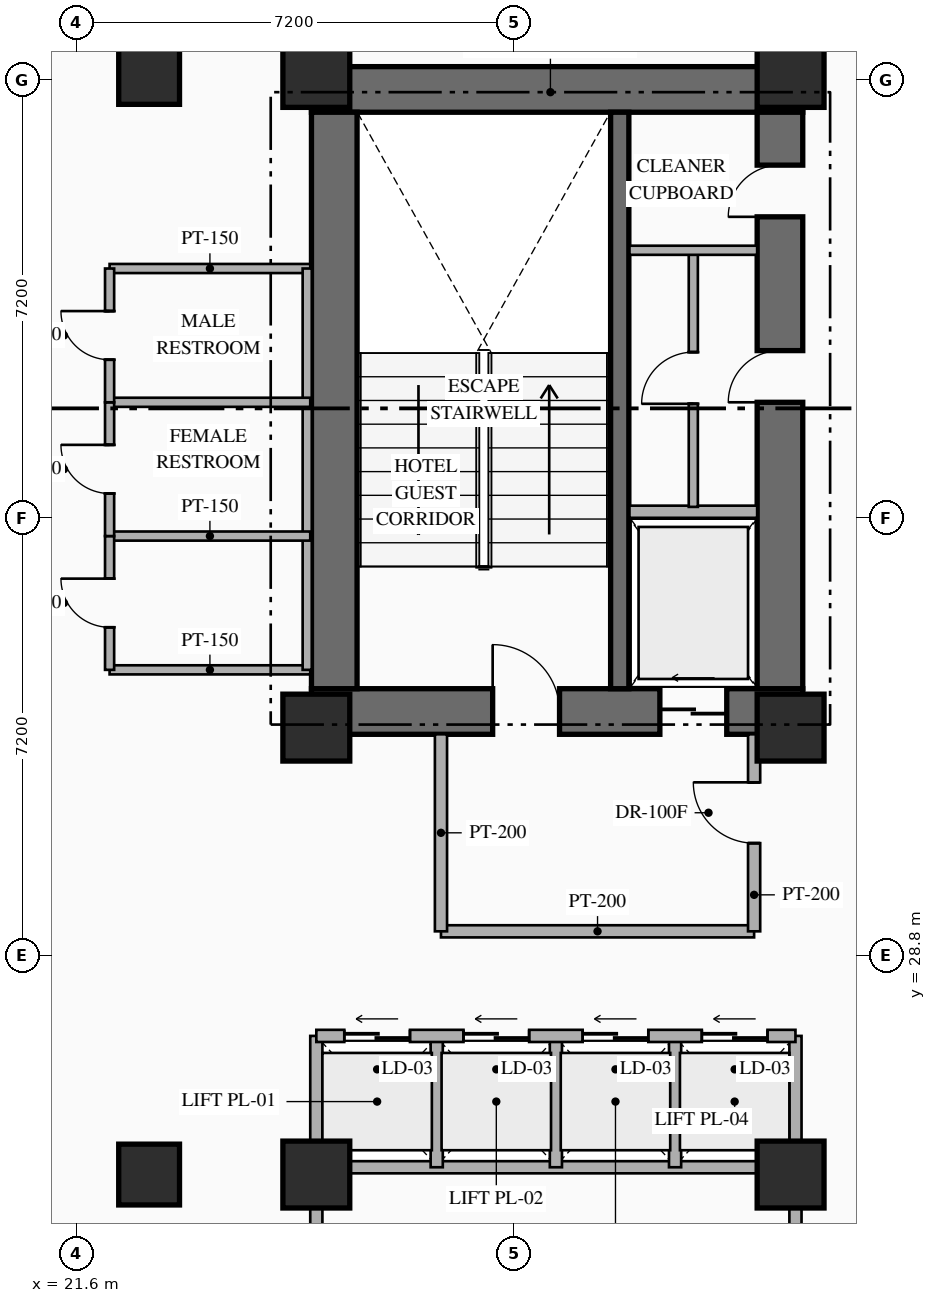
"""IFC4 building model, lengths in metres.
Left out: names, types, materials, properties, quantities, classifications, styles, units other than length and angle.
Written with IfcOpenShell. Run it as: python <this file> out.ifc"""

import sys

from ifc_helpers import new_model, si_unit, direction, frame, frame_2d, origin, origin_2d, place, context, subcontext, project, spatial, rectangle, hollow_rectangle, extrude, element, fill, save


model = new_model("IFC4")
c1 = context("Model", 3, precision=1e-05, world=origin(), true_north=direction((0.0, 1.0)))
c2 = subcontext(c1, "Body", "Model", "MODEL_VIEW")
j1 = project(units=[si_unit("LENGTHUNIT", "METRE"), si_unit("PLANEANGLEUNIT", "RADIAN")], contexts=[c1])
p1 = place(None, origin())
s1 = spatial("IfcSite", under=j1, at=p1, CompositionType="ELEMENT")
p2 = place(p1, origin())
s2 = spatial("IfcBuilding", under=s1, at=p2, CompositionType="ELEMENT")
p3 = place(p2, frame((0.0, 0.0, 53.35)))
s3 = spatial("IfcBuildingStorey", under=s2, at=p3, CompositionType="ELEMENT", Elevation=53.35)
p4 = place(p3, frame((25.47, 32.815, 0.0), z_axis=(0.0, 0.0, 1.0), x_axis=(1.0, 0.0, 0.0)))
e1 = element("IfcWall", 1, at=p4, inside=s3, PredefinedType="SHEAR", context=c2, shape_type="SweptSolid", body=[
    extrude(rectangle(XDim=8.08, YDim=0.75, at=frame_2d((4.04, 0.0))), origin(), (0.0, 0.0, 1.0), 3.35),
])
p5 = place(p4, frame((2.98, 0.0, 0.0)))
e2 = element("IfcOpeningElement", 2, at=p5, cuts=e1, PredefinedType="OPENING", context=c2, shape_type="SweptSolid", body=[
    extrude(rectangle(XDim=1.1, YDim=2.2, at=frame_2d((0.55, 1.1))), frame((0.0, 0.385, 0.0), z_axis=(0.0, -1.0, 0.0), x_axis=(1.0, 0.0, 0.0)), (0.0, 0.0, 1.0), 0.77),
])
p6 = place(p4, frame((5.73, 0.0, 0.0)))
e3 = element("IfcOpeningElement", 3, at=p6, cuts=e1, PredefinedType="OPENING", context=c2, shape_type="SweptSolid", body=[
    extrude(rectangle(XDim=1.1, YDim=2.15, at=frame_2d((0.55, 1.075))), frame((0.0, 0.385, 0.0), z_axis=(0.0, -1.0, 0.0), x_axis=(1.0, 0.0, 0.0)), (0.0, 0.0, 1.0), 0.77),
])
p7 = place(p3, frame((25.47, 43.045, 0.0), z_axis=(0.0, 0.0, 1.0), x_axis=(1.0, 0.0, 0.0)))
e4 = element("IfcWall", 4, at=p7, inside=s3, PredefinedType="SHEAR", context=c2, shape_type="SweptSolid", body=[
    extrude(rectangle(XDim=8.08, YDim=0.75, at=frame_2d((4.04, 0.0))), origin(), (0.0, 0.0, 1.0), 3.35),
])
p8 = place(p3, frame((25.845, 33.19, 0.0), z_axis=(0.0, 0.0, 1.0), x_axis=(0.0, 1.0, 0.0)))
e5 = element("IfcWall", 5, at=p8, inside=s3, PredefinedType="SHEAR", context=c2, shape_type="SweptSolid", body=[
    extrude(rectangle(XDim=9.48, YDim=0.75, at=frame_2d((4.74, 0.0))), origin(), (0.0, 0.0, 1.0), 3.35),
])
p9 = place(p3, frame((33.175, 33.19, 0.0), z_axis=(0.0, 0.0, 1.0), x_axis=(0.0, 1.0, 0.0)))
e6 = element("IfcWall", 6, at=p9, inside=s3, PredefinedType="SHEAR", context=c2, shape_type="SweptSolid", body=[
    extrude(rectangle(XDim=9.48, YDim=0.75, at=frame_2d((4.74, 0.0))), origin(), (0.0, 0.0, 1.0), 3.35),
])
p10 = place(p9, frame((4.71, 0.0, 0.0)))
e7 = element("IfcOpeningElement", 7, at=p10, cuts=e6, PredefinedType="OPENING", context=c2, shape_type="SweptSolid", body=[
    extrude(rectangle(XDim=0.85, YDim=2.08, at=frame_2d((0.425, 1.04))), frame((0.0, 0.385, 0.0), z_axis=(0.0, -1.0, 0.0), x_axis=(1.0, 0.0, 0.0)), (0.0, 0.0, 1.0), 0.77),
])
p11 = place(p9, frame((7.76, 0.0, 0.0)))
e8 = element("IfcOpeningElement", 8, at=p11, cuts=e6, PredefinedType="OPENING", context=c2, shape_type="SweptSolid", body=[
    extrude(rectangle(XDim=0.85, YDim=2.08, at=frame_2d((0.425, 1.04))), frame((0.0, 0.385, 0.0), z_axis=(0.0, -1.0, 0.0), x_axis=(1.0, 0.0, 0.0)), (0.0, 0.0, 1.0), 0.77),
])
p12 = place(p3, frame((30.54, 33.19, 0.0), z_axis=(0.0, 0.0, 1.0), x_axis=(0.0, 1.0, 0.0)))
e9 = element("IfcWall", 9, at=p12, inside=s3, PredefinedType="SHEAR", context=c2, shape_type="SweptSolid", body=[
    extrude(rectangle(XDim=9.48, YDim=0.3, at=frame_2d((4.74, 0.0))), origin(), (0.0, 0.0, 1.0), 3.35),
])
for number, where, z_axis, x_axis in (
    (10, (25.55, 32.55, 0.0), (0.0, 0.0, 1.0), (1.0, 0.0, 0.0)),
    (11, (33.35, 32.55, 0.0), (0.0, 0.0, 1.0), (1.0, 0.0, 0.0)),
    (12, (25.55, 43.3, 0.0), (0.0, 0.0, 1.0), (1.0, 0.0, 0.0)),
    (13, (33.35, 43.3, 0.0), (0.0, 0.0, 1.0), (1.0, 0.0, 0.0)),
):
    element("IfcColumn", number, at=place(p3, frame(where, z_axis=z_axis, x_axis=x_axis)), inside=s3, PredefinedType="COLUMN", context=c2, shape_type="SweptSolid", body=[
        extrude(rectangle(XDim=1.1, YDim=1.1, at=origin_2d()), origin(), (0.0, 0.0, 1.0), 3.35),
    ])
for number, where, z_axis, x_axis in (
    (14, (25.55, 25.2, 0.0), (0.0, 0.0, 1.0), (1.0, 0.0, 0.0)),
    (15, (33.35, 25.2, 0.0), (0.0, 0.0, 1.0), (1.0, 0.0, 0.0)),
):
    element("IfcColumn", number, at=place(p3, frame(where, z_axis=z_axis, x_axis=x_axis)), inside=s3, PredefinedType="COLUMN", context=c2, shape_type="SweptSolid", body=[
        extrude(hollow_rectangle(XDim=1.1, YDim=1.1, WallThickness=0.04, at=origin_2d()), origin(), (0.0, 0.0, 1.0), 3.35),
    ])
for number, where, z_axis, x_axis in (
    (16, (22.8, 25.2, 0.0), (0.0, 0.0, 1.0), (1.0, 0.0, 0.0)),
    (17, (22.8, 43.3, 0.0), (0.0, 0.0, 1.0), (1.0, 0.0, 0.0)),
):
    element("IfcColumn", number, at=place(p3, frame(where, z_axis=z_axis, x_axis=x_axis)), inside=s3, PredefinedType="COLUMN", context=c2, shape_type="SweptSolid", body=[
        extrude(hollow_rectangle(XDim=1.0, YDim=1.0, WallThickness=0.038, at=origin_2d()), origin(), (0.0, 0.0, 1.0), 3.35),
    ])
p13 = place(p3, frame((30.7, 36.1, 0.0), z_axis=(0.0, 0.0, 1.0), x_axis=(1.0, 0.0, 0.0)))
e18 = element("IfcWall", 18, at=p13, inside=s3, PredefinedType="STANDARD", context=c2, shape_type="SweptSolid", body=[
    extrude(rectangle(XDim=2.1, YDim=0.2, at=frame_2d((1.05, 0.0))), origin(), (0.0, 0.0, 1.0), 3.13),
])
p14 = place(p3, frame((31.75, 36.18, 0.0), z_axis=(0.0, 0.0, 1.0), x_axis=(0.0, 1.0, 0.0)))
e19 = element("IfcWall", 19, at=p14, inside=s3, PredefinedType="PARTITIONING", context=c2, shape_type="SweptSolid", body=[
    extrude(rectangle(XDim=4.24, YDim=0.15, at=frame_2d((2.12, 0.0))), origin(), (0.0, 0.0, 1.0), 3.13),
])
p15 = place(p14, frame((1.695, 0.0, 0.0)))
e20 = element("IfcOpeningElement", 20, at=p15, cuts=e19, PredefinedType="OPENING", context=c2, shape_type="SweptSolid", body=[
    extrude(rectangle(XDim=0.85, YDim=2.08, at=frame_2d((0.425, 1.04))), frame((0.0, 0.085, 0.0), z_axis=(0.0, -1.0, 0.0), x_axis=(1.0, 0.0, 0.0)), (0.0, 0.0, 1.0), 0.17),
])
p16 = place(p3, frame((30.7, 40.4, 0.0), z_axis=(0.0, 0.0, 1.0), x_axis=(1.0, 0.0, 0.0)))
e21 = element("IfcWall", 21, at=p16, inside=s3, PredefinedType="PARTITIONING", context=c2, shape_type="SweptSolid", body=[
    extrude(rectangle(XDim=2.1, YDim=0.15, at=frame_2d((1.05, 0.0))), origin(), (0.0, 0.0, 1.0), 3.13),
])
p17 = place(p3, frame((27.6, 29.2, 0.0), z_axis=(0.0, 0.0, 1.0), x_axis=(1.0, 0.0, 0.0)))
e22 = element("IfcWall", 22, at=p17, inside=s3, PredefinedType="STANDARD", context=c2, shape_type="SweptSolid", body=[
    extrude(rectangle(XDim=5.15, YDim=0.2, at=frame_2d((2.575, 0.0))), origin(), (0.0, 0.0, 1.0), 3.13),
])
p18 = place(p3, frame((27.6, 29.2, 0.0), z_axis=(0.0, 0.0, 1.0), x_axis=(0.0, 1.0, 0.0)))
e23 = element("IfcWall", 23, at=p18, inside=s3, PredefinedType="STANDARD", context=c2, shape_type="SweptSolid", body=[
    extrude(rectangle(XDim=3.24, YDim=0.2, at=frame_2d((1.62, 0.0))), origin(), (0.0, 0.0, 1.0), 3.13),
])
p19 = place(p3, frame((32.75, 29.2, 0.0), z_axis=(0.0, 0.0, 1.0), x_axis=(0.0, 1.0, 0.0)))
e24 = element("IfcWall", 24, at=p19, inside=s3, PredefinedType="STANDARD", context=c2, shape_type="SweptSolid", body=[
    extrude(rectangle(XDim=3.24, YDim=0.2, at=frame_2d((1.62, 0.0))), origin(), (0.0, 0.0, 1.0), 3.13),
])
p20 = place(p19, frame((1.45, 0.0, 0.0)))
e25 = element("IfcOpeningElement", 25, at=p20, cuts=e24, PredefinedType="OPENING", context=c2, shape_type="SweptSolid", body=[
    extrude(rectangle(XDim=1.0, YDim=2.2, at=frame_2d((0.5, 1.1))), frame((0.0, 0.11, 0.0), z_axis=(0.0, -1.0, 0.0), x_axis=(1.0, 0.0, 0.0)), (0.0, 0.0, 1.0), 0.22),
])
for number, where, z_axis, x_axis in (
    (26, (25.55, 23.4, 0.0), (0.0, 0.0, 1.0), (0.0, 1.0, 0.0)),
    (27, (33.43, 23.4, 0.0), (0.0, 0.0, 1.0), (0.0, 1.0, 0.0)),
):
    element("IfcWall", number, at=place(p3, frame(where, z_axis=z_axis, x_axis=x_axis)), inside=s3, PredefinedType="STANDARD", context=c2, shape_type="SweptSolid", body=[
        extrude(rectangle(XDim=4.08, YDim=0.2, at=frame_2d((2.04, 0.0))), origin(), (0.0, 0.0, 1.0), 2.425),
    ])
p21 = place(p3, frame((25.55, 25.32, 0.0), z_axis=(0.0, 0.0, 1.0), x_axis=(1.0, 0.0, 0.0)))
e28 = element("IfcWall", 28, at=p21, inside=s3, PredefinedType="STANDARD", context=c2, shape_type="SweptSolid", body=[
    extrude(rectangle(XDim=7.88, YDim=0.2, at=frame_2d((3.94, 0.0))), origin(), (0.0, 0.0, 1.0), 2.525),
])
for number, where, z_axis, x_axis in (
    (29, (27.53, 25.32, 0.0), (0.0, 0.0, 1.0), (0.0, 1.0, 0.0)),
    (30, (29.49, 25.32, 0.0), (0.0, 0.0, 1.0), (0.0, 1.0, 0.0)),
    (31, (31.45, 25.32, 0.0), (0.0, 0.0, 1.0), (0.0, 1.0, 0.0)),
):
    element("IfcWall", number, at=place(p3, frame(where, z_axis=z_axis, x_axis=x_axis)), inside=s3, PredefinedType="STANDARD", context=c2, shape_type="SweptSolid", body=[
        extrude(rectangle(XDim=2.16, YDim=0.2, at=frame_2d((1.08, 0.0))), origin(), (0.0, 0.0, 1.0), 3.13),
    ])
p22 = place(p3, frame((25.55, 27.48, 0.0), z_axis=(0.0, 0.0, 1.0), x_axis=(1.0, 0.0, 0.0)))
e32 = element("IfcWall", 32, at=p22, inside=s3, PredefinedType="STANDARD", context=c2, shape_type="SweptSolid", body=[
    extrude(rectangle(XDim=7.88, YDim=0.2, at=frame_2d((3.94, 0.0))), origin(), (0.0, 0.0, 1.0), 3.13),
])
p23 = place(p22, frame((0.46, 0.0, 0.0)))
e33 = element("IfcOpeningElement", 33, at=p23, cuts=e32, PredefinedType="OPENING", context=c2, shape_type="SweptSolid", body=[
    extrude(rectangle(XDim=1.08, YDim=2.15, at=frame_2d((0.54, 1.075))), frame((0.0, 0.11, 0.0), z_axis=(0.0, -1.0, 0.0), x_axis=(1.0, 0.0, 0.0)), (0.0, 0.0, 1.0), 0.22),
])
p24 = place(p22, frame((2.42, 0.0, 0.0)))
e34 = element("IfcOpeningElement", 34, at=p24, cuts=e32, PredefinedType="OPENING", context=c2, shape_type="SweptSolid", body=[
    extrude(rectangle(XDim=1.08, YDim=2.15, at=frame_2d((0.54, 1.075))), frame((0.0, 0.11, 0.0), z_axis=(0.0, -1.0, 0.0), x_axis=(1.0, 0.0, 0.0)), (0.0, 0.0, 1.0), 0.22),
])
p25 = place(p22, frame((4.38, 0.0, 0.0)))
e35 = element("IfcOpeningElement", 35, at=p25, cuts=e32, PredefinedType="OPENING", context=c2, shape_type="SweptSolid", body=[
    extrude(rectangle(XDim=1.08, YDim=2.15, at=frame_2d((0.54, 1.075))), frame((0.0, 0.11, 0.0), z_axis=(0.0, -1.0, 0.0), x_axis=(1.0, 0.0, 0.0)), (0.0, 0.0, 1.0), 0.22),
])
p26 = place(p22, frame((6.34, 0.0, 0.0)))
e36 = element("IfcOpeningElement", 36, at=p26, cuts=e32, PredefinedType="OPENING", context=c2, shape_type="SweptSolid", body=[
    extrude(rectangle(XDim=1.08, YDim=2.15, at=frame_2d((0.54, 1.075))), frame((0.0, 0.11, 0.0), z_axis=(0.0, -1.0, 0.0), x_axis=(1.0, 0.0, 0.0)), (0.0, 0.0, 1.0), 0.22),
])
for number, where, z_axis, x_axis in (
    (37, (22.15, 33.5, 0.0), (0.0, 0.0, 1.0), (1.0, 0.0, 0.0)),
    (38, (22.15, 40.1, 0.0), (0.0, 0.0, 1.0), (1.0, 0.0, 0.0)),
):
    element("IfcWall", number, at=place(p3, frame(where, z_axis=z_axis, x_axis=x_axis)), inside=s3, PredefinedType="PARTITIONING", context=c2, shape_type="SweptSolid", body=[
        extrude(rectangle(XDim=3.3, YDim=0.15, at=frame_2d((1.65, 0.0))), origin(), (0.0, 0.0, 1.0), 3.13),
    ])
p27 = place(p3, frame((25.4, 33.5, 0.0), z_axis=(0.0, 0.0, 1.0), x_axis=(0.0, 1.0, 0.0)))
e39 = element("IfcWall", 39, at=p27, inside=s3, PredefinedType="PARTITIONING", context=c2, shape_type="SweptSolid", body=[
    extrude(rectangle(XDim=6.6, YDim=0.15, at=frame_2d((3.3, 0.0))), origin(), (0.0, 0.0, 1.0), 3.13),
])
for number, where, z_axis, x_axis in (
    (40, (22.15, 35.7, 0.0), (0.0, 0.0, 1.0), (1.0, 0.0, 0.0)),
    (41, (22.15, 37.9, 0.0), (0.0, 0.0, 1.0), (1.0, 0.0, 0.0)),
):
    element("IfcWall", number, at=place(p3, frame(where, z_axis=z_axis, x_axis=x_axis)), inside=s3, PredefinedType="PARTITIONING", context=c2, shape_type="SweptSolid", body=[
        extrude(rectangle(XDim=3.3, YDim=0.15, at=frame_2d((1.65, 0.0))), origin(), (0.0, 0.0, 1.0), 3.13),
    ])
p28 = place(p3, frame((22.15, 33.5, 0.0), z_axis=(0.0, 0.0, 1.0), x_axis=(0.0, 1.0, 0.0)))
e42 = element("IfcWall", 42, at=p28, inside=s3, PredefinedType="PARTITIONING", context=c2, shape_type="SweptSolid", body=[
    extrude(rectangle(XDim=2.2, YDim=0.15, at=frame_2d((1.1, 0.0))), origin(), (0.0, 0.0, 1.0), 3.13),
])
p29 = place(p28, frame((0.7, 0.0, 0.0)))
e43 = element("IfcOpeningElement", 43, at=p29, cuts=e42, PredefinedType="OPENING", context=c2, shape_type="SweptSolid", body=[
    extrude(rectangle(XDim=0.8, YDim=2.06, at=frame_2d((0.4, 1.03))), frame((0.0, 0.085, 0.0), z_axis=(0.0, -1.0, 0.0), x_axis=(1.0, 0.0, 0.0)), (0.0, 0.0, 1.0), 0.17),
])
p30 = place(p3, frame((22.15, 35.7, 0.0), z_axis=(0.0, 0.0, 1.0), x_axis=(0.0, 1.0, 0.0)))
e44 = element("IfcWall", 44, at=p30, inside=s3, PredefinedType="PARTITIONING", context=c2, shape_type="SweptSolid", body=[
    extrude(rectangle(XDim=2.2, YDim=0.15, at=frame_2d((1.1, 0.0))), origin(), (0.0, 0.0, 1.0), 3.13),
])
p31 = place(p30, frame((0.7, 0.0, 0.0)))
e45 = element("IfcOpeningElement", 45, at=p31, cuts=e44, PredefinedType="OPENING", context=c2, shape_type="SweptSolid", body=[
    extrude(rectangle(XDim=0.8, YDim=2.06, at=frame_2d((0.4, 1.03))), frame((0.0, 0.085, 0.0), z_axis=(0.0, -1.0, 0.0), x_axis=(1.0, 0.0, 0.0)), (0.0, 0.0, 1.0), 0.17),
])
p32 = place(p3, frame((22.15, 37.9, 0.0), z_axis=(0.0, 0.0, 1.0), x_axis=(0.0, 1.0, 0.0)))
e46 = element("IfcWall", 46, at=p32, inside=s3, PredefinedType="PARTITIONING", context=c2, shape_type="SweptSolid", body=[
    extrude(rectangle(XDim=2.2, YDim=0.15, at=frame_2d((1.1, 0.0))), origin(), (0.0, 0.0, 1.0), 3.13),
])
p33 = place(p32, frame((0.7, 0.0, 0.0)))
e47 = element("IfcOpeningElement", 47, at=p33, cuts=e46, PredefinedType="OPENING", context=c2, shape_type="SweptSolid", body=[
    extrude(rectangle(XDim=0.8, YDim=2.06, at=frame_2d((0.4, 1.03))), frame((0.0, 0.085, 0.0), z_axis=(0.0, -1.0, 0.0), x_axis=(1.0, 0.0, 0.0)), (0.0, 0.0, 1.0), 0.17),
])
p34 = place(p3, frame((33.384, 17.312, 0.0), z_axis=(0.0, 0.0, 1.0), x_axis=(0.600008743659, 0.799993442181, 0.0)))
e48 = element("IfcWall", 48, at=p34, inside=s3, PredefinedType="PARTITIONING", context=c2, shape_type="SweptSolid", body=[
    extrude(rectangle(XDim=8.935, YDim=0.15, at=frame_2d((4.468, 0.0))), origin(), (0.0, 0.0, 1.0), 3.13),
])
p35 = place(p5, origin())
e49 = element("IfcDoor", 49, at=p35, inside=s3, OperationType="SINGLE_SWING_LEFT", PredefinedType="DOOR", context=c2, shape_type="SweptSolid", body=[
    extrude(rectangle(XDim=1.1, YDim=2.2, at=frame_2d((0.55, 1.1))), frame((0.0, 0.025, 0.0), z_axis=(0.0, -1.0, 0.0), x_axis=(1.0, 0.0, 0.0)), (0.0, 0.0, 1.0), 0.05),
])
fill(e2, e49)
p36 = place(p6, origin())
e50 = element("IfcDoor", 50, at=p36, inside=s3, OperationType="SLIDING_TO_LEFT", PredefinedType="USERDEFINED", context=c2, shape_type="SweptSolid", body=[
    extrude(rectangle(XDim=1.1, YDim=2.15, at=frame_2d((0.55, 1.075))), frame((0.0, 0.025, 0.0), z_axis=(0.0, -1.0, 0.0), x_axis=(1.0, 0.0, 0.0)), (0.0, 0.0, 1.0), 0.05),
])
fill(e3, e50)
p37 = place(p10, origin())
e51 = element("IfcDoor", 51, at=p37, inside=s3, OperationType="SINGLE_SWING_LEFT", PredefinedType="DOOR", context=c2, shape_type="SweptSolid", body=[
    extrude(rectangle(XDim=0.85, YDim=2.08, at=frame_2d((0.425, 1.04))), frame((0.0, 0.025, 0.0), z_axis=(0.0, -1.0, 0.0), x_axis=(1.0, 0.0, 0.0)), (0.0, 0.0, 1.0), 0.05),
])
fill(e7, e51)
p38 = place(p11, origin())
e52 = element("IfcDoor", 52, at=p38, inside=s3, OperationType="SINGLE_SWING_LEFT", PredefinedType="DOOR", context=c2, shape_type="SweptSolid", body=[
    extrude(rectangle(XDim=0.85, YDim=2.08, at=frame_2d((0.425, 1.04))), frame((0.0, 0.025, 0.0), z_axis=(0.0, -1.0, 0.0), x_axis=(1.0, 0.0, 0.0)), (0.0, 0.0, 1.0), 0.05),
])
fill(e8, e52)
p39 = place(p15, origin())
e53 = element("IfcDoor", 53, at=p39, inside=s3, OperationType="SINGLE_SWING_LEFT", PredefinedType="DOOR", context=c2, shape_type="SweptSolid", body=[
    extrude(rectangle(XDim=0.85, YDim=2.08, at=frame_2d((0.425, 1.04))), frame((0.0, 0.025, 0.0), z_axis=(0.0, -1.0, 0.0), x_axis=(1.0, 0.0, 0.0)), (0.0, 0.0, 1.0), 0.05),
])
fill(e20, e53)
p40 = place(p20, origin())
e54 = element("IfcDoor", 54, at=p40, inside=s3, OperationType="SINGLE_SWING_RIGHT", PredefinedType="DOOR", context=c2, shape_type="SweptSolid", body=[
    extrude(rectangle(XDim=1.0, YDim=2.2, at=frame_2d((0.5, 1.1))), frame((0.0, 0.025, 0.0), z_axis=(0.0, -1.0, 0.0), x_axis=(1.0, 0.0, 0.0)), (0.0, 0.0, 1.0), 0.05),
])
fill(e25, e54)
p41 = place(p23, origin())
e55 = element("IfcDoor", 55, at=p41, inside=s3, OperationType="SLIDING_TO_LEFT", PredefinedType="USERDEFINED", context=c2, shape_type="SweptSolid", body=[
    extrude(rectangle(XDim=1.08, YDim=2.15, at=frame_2d((0.54, 1.075))), frame((0.0, 0.025, 0.0), z_axis=(0.0, -1.0, 0.0), x_axis=(1.0, 0.0, 0.0)), (0.0, 0.0, 1.0), 0.05),
])
fill(e33, e55)
p42 = place(p24, origin())
e56 = element("IfcDoor", 56, at=p42, inside=s3, OperationType="SLIDING_TO_LEFT", PredefinedType="USERDEFINED", context=c2, shape_type="SweptSolid", body=[
    extrude(rectangle(XDim=1.08, YDim=2.15, at=frame_2d((0.54, 1.075))), frame((0.0, 0.025, 0.0), z_axis=(0.0, -1.0, 0.0), x_axis=(1.0, 0.0, 0.0)), (0.0, 0.0, 1.0), 0.05),
])
fill(e34, e56)
p43 = place(p25, origin())
e57 = element("IfcDoor", 57, at=p43, inside=s3, OperationType="SLIDING_TO_LEFT", PredefinedType="USERDEFINED", context=c2, shape_type="SweptSolid", body=[
    extrude(rectangle(XDim=1.08, YDim=2.15, at=frame_2d((0.54, 1.075))), frame((0.0, 0.025, 0.0), z_axis=(0.0, -1.0, 0.0), x_axis=(1.0, 0.0, 0.0)), (0.0, 0.0, 1.0), 0.05),
])
fill(e35, e57)
p44 = place(p26, origin())
e58 = element("IfcDoor", 58, at=p44, inside=s3, OperationType="SLIDING_TO_LEFT", PredefinedType="USERDEFINED", context=c2, shape_type="SweptSolid", body=[
    extrude(rectangle(XDim=1.08, YDim=2.15, at=frame_2d((0.54, 1.075))), frame((0.0, 0.025, 0.0), z_axis=(0.0, -1.0, 0.0), x_axis=(1.0, 0.0, 0.0)), (0.0, 0.0, 1.0), 0.05),
])
fill(e36, e58)
p45 = place(p29, origin())
e59 = element("IfcDoor", 59, at=p45, inside=s3, OperationType="SINGLE_SWING_RIGHT", PredefinedType="DOOR", context=c2, shape_type="SweptSolid", body=[
    extrude(rectangle(XDim=0.8, YDim=2.06, at=frame_2d((0.4, 1.03))), frame((0.0, 0.025, 0.0), z_axis=(0.0, -1.0, 0.0), x_axis=(1.0, 0.0, 0.0)), (0.0, 0.0, 1.0), 0.05),
])
fill(e43, e59)
p46 = place(p31, origin())
e60 = element("IfcDoor", 60, at=p46, inside=s3, OperationType="SINGLE_SWING_RIGHT", PredefinedType="DOOR", context=c2, shape_type="SweptSolid", body=[
    extrude(rectangle(XDim=0.8, YDim=2.06, at=frame_2d((0.4, 1.03))), frame((0.0, 0.025, 0.0), z_axis=(0.0, -1.0, 0.0), x_axis=(1.0, 0.0, 0.0)), (0.0, 0.0, 1.0), 0.05),
])
fill(e45, e60)
p47 = place(p33, origin())
e61 = element("IfcDoor", 61, at=p47, inside=s3, OperationType="SINGLE_SWING_RIGHT", PredefinedType="DOOR", context=c2, shape_type="SweptSolid", body=[
    extrude(rectangle(XDim=0.8, YDim=2.06, at=frame_2d((0.4, 1.03))), frame((0.0, 0.025, 0.0), z_axis=(0.0, -1.0, 0.0), x_axis=(1.0, 0.0, 0.0)), (0.0, 0.0, 1.0), 0.05),
])
fill(e47, e61)
save(model, sys.argv[1])
